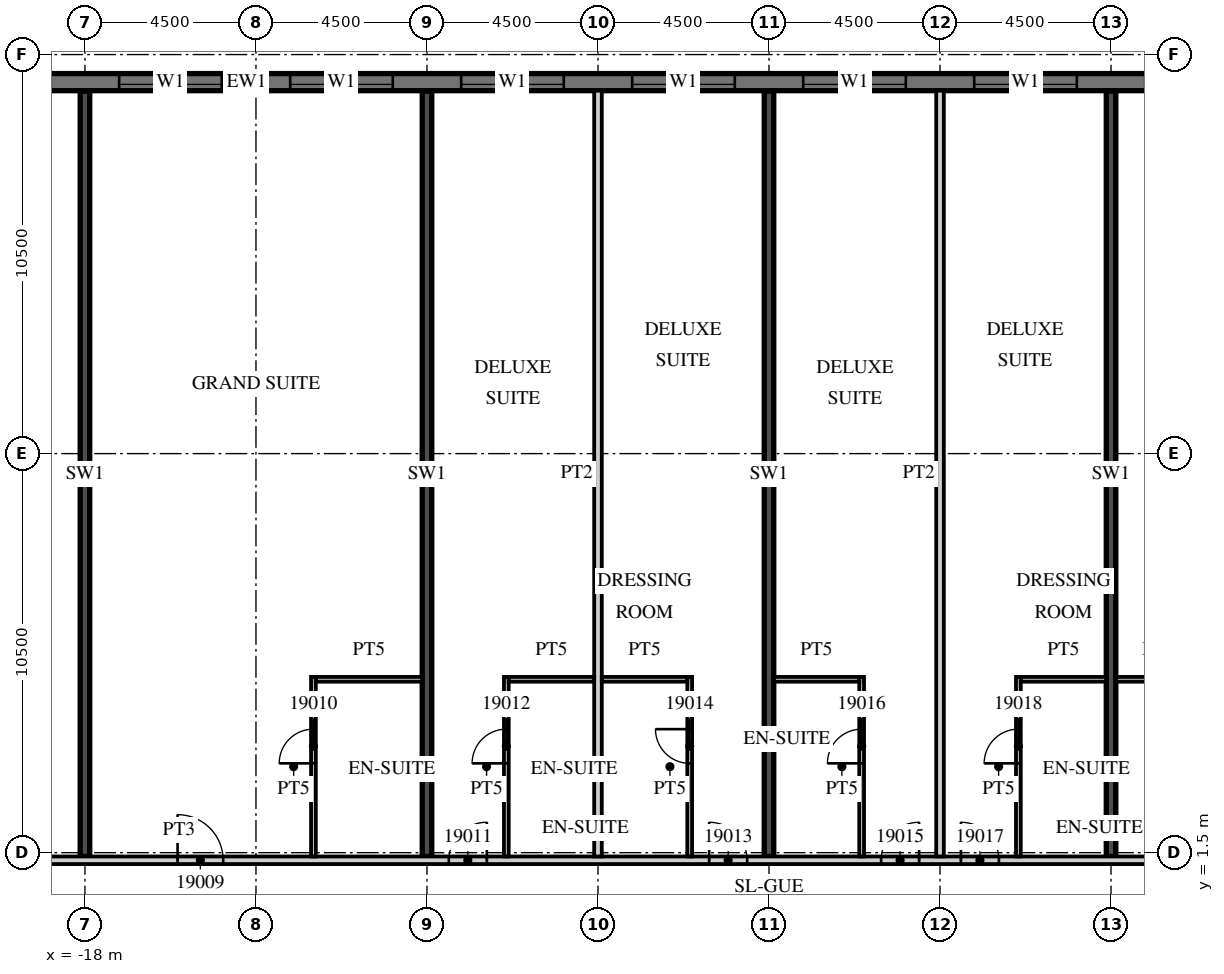
"""IFC4 building model, lengths in metres.
Left out: names, types, materials, properties, quantities, classifications, styles, units other than length and angle.
Written with IfcOpenShell. Run it as: python <this file> out.ifc"""

import sys

from ifc_helpers import new_model, si_unit, direction, frame, frame_2d, origin, place, context, subcontext, project, spatial, rectangle, extrude, element, fill, save


model = new_model("IFC4")
c1 = context("Model", 3, precision=1e-05, world=origin(), true_north=direction((0.0, 1.0)))
c2 = subcontext(c1, "Body", "Model", "MODEL_VIEW")
j1 = project(units=[si_unit("LENGTHUNIT", "METRE"), si_unit("PLANEANGLEUNIT", "RADIAN")], contexts=[c1])
p1 = place(None, origin())
s1 = spatial("IfcSite", under=j1, at=p1, CompositionType="ELEMENT")
p2 = place(p1, origin())
s2 = spatial("IfcBuilding", under=s1, at=p2, CompositionType="ELEMENT")
p3 = place(p2, frame((0.0, 0.0, 93.0)))
s3 = spatial("IfcBuildingStorey", under=s2, at=p3, CompositionType="ELEMENT", Elevation=93.0)
for number, where, z_axis, x_axis in (
    (1, (-18.0, 1.4, 0.0), (0.0, 0.0, 1.0), (0.0, 1.0, 0.0)),
    (2, (-9.0, 1.4, 0.0), (0.0, 0.0, 1.0), (0.0, 1.0, 0.0)),
    (3, (0.0, 1.4, 0.0), (0.0, 0.0, 1.0), (0.0, 1.0, 0.0)),
    (4, (9.0, 1.4, 0.0), (0.0, 0.0, 1.0), (0.0, 1.0, 0.0)),
):
    element("IfcWall", number, at=place(p3, frame(where, z_axis=z_axis, x_axis=x_axis)), inside=s3, PredefinedType="SHEAR", context=c2, shape_type="SweptSolid", body=[
        extrude(rectangle(XDim=20.14, YDim=0.25, at=frame_2d((10.07, 0.0))), origin(), (0.0, 0.0, 1.0), 3.3),
    ])
p4 = place(p3, frame((13.5, 21.775, 0.0), z_axis=(0.0, 0.0, 1.0), x_axis=(-1.0, 0.0, 0.0)))
e5 = element("IfcWall", 5, at=p4, inside=s3, PredefinedType="SOLIDWALL", context=c2, shape_type="SweptSolid", body=[
    extrude(rectangle(XDim=54.5, YDim=0.45, at=frame_2d((27.25, 0.0))), origin(), (0.0, 0.0, 1.0), 3.02),
])
p5 = place(p4, frame((0.9, 0.0, 0.45)))
e6 = element("IfcOpeningElement", 6, at=p5, cuts=e5, PredefinedType="OPENING", context=c2, shape_type="SweptSolid", body=[
    extrude(rectangle(XDim=2.7, YDim=2.25, at=frame_2d((1.35, 1.125))), frame((0.0, 0.235, 0.0), z_axis=(0.0, -1.0, 0.0), x_axis=(1.0, 0.0, 0.0)), (0.0, 0.0, 1.0), 0.47),
])
p6 = place(p4, frame((5.4, 0.0, 0.45)))
e7 = element("IfcOpeningElement", 7, at=p6, cuts=e5, PredefinedType="OPENING", context=c2, shape_type="SweptSolid", body=[
    extrude(rectangle(XDim=2.7, YDim=2.25, at=frame_2d((1.35, 1.125))), frame((0.0, 0.235, 0.0), z_axis=(0.0, -1.0, 0.0), x_axis=(1.0, 0.0, 0.0)), (0.0, 0.0, 1.0), 0.47),
])
p7 = place(p4, frame((9.9, 0.0, 0.45)))
e8 = element("IfcOpeningElement", 8, at=p7, cuts=e5, PredefinedType="OPENING", context=c2, shape_type="SweptSolid", body=[
    extrude(rectangle(XDim=2.7, YDim=2.25, at=frame_2d((1.35, 1.125))), frame((0.0, 0.235, 0.0), z_axis=(0.0, -1.0, 0.0), x_axis=(1.0, 0.0, 0.0)), (0.0, 0.0, 1.0), 0.47),
])
p8 = place(p4, frame((14.4, 0.0, 0.45)))
e9 = element("IfcOpeningElement", 9, at=p8, cuts=e5, PredefinedType="OPENING", context=c2, shape_type="SweptSolid", body=[
    extrude(rectangle(XDim=2.7, YDim=2.25, at=frame_2d((1.35, 1.125))), frame((0.0, 0.235, 0.0), z_axis=(0.0, -1.0, 0.0), x_axis=(1.0, 0.0, 0.0)), (0.0, 0.0, 1.0), 0.47),
])
p9 = place(p4, frame((18.9, 0.0, 0.45)))
e10 = element("IfcOpeningElement", 10, at=p9, cuts=e5, PredefinedType="OPENING", context=c2, shape_type="SweptSolid", body=[
    extrude(rectangle(XDim=2.7, YDim=2.25, at=frame_2d((1.35, 1.125))), frame((0.0, 0.235, 0.0), z_axis=(0.0, -1.0, 0.0), x_axis=(1.0, 0.0, 0.0)), (0.0, 0.0, 1.0), 0.47),
])
p10 = place(p4, frame((23.4, 0.0, 0.45)))
e11 = element("IfcOpeningElement", 11, at=p10, cuts=e5, PredefinedType="OPENING", context=c2, shape_type="SweptSolid", body=[
    extrude(rectangle(XDim=2.7, YDim=2.25, at=frame_2d((1.35, 1.125))), frame((0.0, 0.235, 0.0), z_axis=(0.0, -1.0, 0.0), x_axis=(1.0, 0.0, 0.0)), (0.0, 0.0, 1.0), 0.47),
])
p11 = place(p4, frame((27.9, 0.0, 0.45)))
e12 = element("IfcOpeningElement", 12, at=p11, cuts=e5, PredefinedType="OPENING", context=c2, shape_type="SweptSolid", body=[
    extrude(rectangle(XDim=2.7, YDim=2.25, at=frame_2d((1.35, 1.125))), frame((0.0, 0.235, 0.0), z_axis=(0.0, -1.0, 0.0), x_axis=(1.0, 0.0, 0.0)), (0.0, 0.0, 1.0), 0.47),
])
p12 = place(p4, frame((32.4, 0.0, 0.45)))
e13 = element("IfcOpeningElement", 13, at=p12, cuts=e5, PredefinedType="OPENING", context=c2, shape_type="SweptSolid", body=[
    extrude(rectangle(XDim=2.7, YDim=2.25, at=frame_2d((1.35, 1.125))), frame((0.0, 0.235, 0.0), z_axis=(0.0, -1.0, 0.0), x_axis=(1.0, 0.0, 0.0)), (0.0, 0.0, 1.0), 0.47),
])
p13 = place(p4, frame((36.9, 0.0, 0.45)))
e14 = element("IfcOpeningElement", 14, at=p13, cuts=e5, PredefinedType="OPENING", context=c2, shape_type="SweptSolid", body=[
    extrude(rectangle(XDim=2.7, YDim=2.25, at=frame_2d((1.35, 1.125))), frame((0.0, 0.235, 0.0), z_axis=(0.0, -1.0, 0.0), x_axis=(1.0, 0.0, 0.0)), (0.0, 0.0, 1.0), 0.47),
])
p14 = place(p4, frame((41.4, 0.0, 0.45)))
e15 = element("IfcOpeningElement", 15, at=p14, cuts=e5, PredefinedType="OPENING", context=c2, shape_type="SweptSolid", body=[
    extrude(rectangle(XDim=2.7, YDim=2.25, at=frame_2d((1.35, 1.125))), frame((0.0, 0.235, 0.0), z_axis=(0.0, -1.0, 0.0), x_axis=(1.0, 0.0, 0.0)), (0.0, 0.0, 1.0), 0.47),
])
p15 = place(p4, frame((45.9, 0.0, 0.45)))
e16 = element("IfcOpeningElement", 16, at=p15, cuts=e5, PredefinedType="OPENING", context=c2, shape_type="SweptSolid", body=[
    extrude(rectangle(XDim=2.7, YDim=2.25, at=frame_2d((1.35, 1.125))), frame((0.0, 0.235, 0.0), z_axis=(0.0, -1.0, 0.0), x_axis=(1.0, 0.0, 0.0)), (0.0, 0.0, 1.0), 0.47),
])
p16 = place(p4, frame((50.4, 0.0, 0.45)))
e17 = element("IfcOpeningElement", 17, at=p16, cuts=e5, PredefinedType="OPENING", context=c2, shape_type="SweptSolid", body=[
    extrude(rectangle(XDim=2.7, YDim=2.25, at=frame_2d((1.35, 1.125))), frame((0.0, 0.235, 0.0), z_axis=(0.0, -1.0, 0.0), x_axis=(1.0, 0.0, 0.0)), (0.0, 0.0, 1.0), 0.47),
])
p17 = place(p3, frame((-44.55, 1.3, 0.0), z_axis=(0.0, 0.0, 1.0), x_axis=(1.0, 0.0, 0.0)))
e18 = element("IfcWall", 18, at=p17, inside=s3, PredefinedType="PARTITIONING", context=c2, shape_type="SweptSolid", body=[
    extrude(rectangle(XDim=58.05, YDim=0.2, at=frame_2d((29.025, 0.0))), origin(), (0.0, 0.0, 1.0), 3.02),
])
p18 = place(p17, frame((0.525, 0.0, 0.0)))
e19 = element("IfcOpeningElement", 19, at=p18, cuts=e18, PredefinedType="OPENING", context=c2, shape_type="SweptSolid", body=[
    extrude(rectangle(XDim=1.0, YDim=2.1, at=frame_2d((0.5, 1.05))), frame((0.0, 0.11, 0.0), z_axis=(0.0, -1.0, 0.0), x_axis=(1.0, 0.0, 0.0)), (0.0, 0.0, 1.0), 0.22),
])
p19 = place(p17, frame((4.625, 0.0, 0.0)))
e20 = element("IfcOpeningElement", 20, at=p19, cuts=e18, PredefinedType="OPENING", context=c2, shape_type="SweptSolid", body=[
    extrude(rectangle(XDim=1.0, YDim=2.1, at=frame_2d((0.5, 1.05))), frame((0.0, 0.11, 0.0), z_axis=(0.0, -1.0, 0.0), x_axis=(1.0, 0.0, 0.0)), (0.0, 0.0, 1.0), 0.22),
])
p20 = place(p17, frame((10.987, 0.0, 0.0)))
e21 = element("IfcOpeningElement", 21, at=p20, cuts=e18, PredefinedType="OPENING", context=c2, shape_type="SweptSolid", body=[
    extrude(rectangle(XDim=1.2, YDim=2.1, at=frame_2d((0.6, 1.05))), frame((0.0, 0.11, 0.0), z_axis=(0.0, -1.0, 0.0), x_axis=(1.0, 0.0, 0.0)), (0.0, 0.0, 1.0), 0.22),
])
p21 = place(p17, frame((22.912, 0.0, 0.0)))
e22 = element("IfcOpeningElement", 22, at=p21, cuts=e18, PredefinedType="OPENING", context=c2, shape_type="SweptSolid", body=[
    extrude(rectangle(XDim=1.2, YDim=2.1, at=frame_2d((0.6, 1.05))), frame((0.0, 0.11, 0.0), z_axis=(0.0, -1.0, 0.0), x_axis=(1.0, 0.0, 0.0)), (0.0, 0.0, 1.0), 0.22),
])
p22 = place(p17, frame((28.987, 0.0, 0.0)))
e23 = element("IfcOpeningElement", 23, at=p22, cuts=e18, PredefinedType="OPENING", context=c2, shape_type="SweptSolid", body=[
    extrude(rectangle(XDim=1.2, YDim=2.1, at=frame_2d((0.6, 1.05))), frame((0.0, 0.11, 0.0), z_axis=(0.0, -1.0, 0.0), x_axis=(1.0, 0.0, 0.0)), (0.0, 0.0, 1.0), 0.22),
])
p23 = place(p17, frame((36.125, 0.0, 0.0)))
e24 = element("IfcOpeningElement", 24, at=p23, cuts=e18, PredefinedType="OPENING", context=c2, shape_type="SweptSolid", body=[
    extrude(rectangle(XDim=1.0, YDim=2.1, at=frame_2d((0.5, 1.05))), frame((0.0, 0.11, 0.0), z_axis=(0.0, -1.0, 0.0), x_axis=(1.0, 0.0, 0.0)), (0.0, 0.0, 1.0), 0.22),
])
p24 = place(p17, frame((42.975, 0.0, 0.0)))
e25 = element("IfcOpeningElement", 25, at=p24, cuts=e18, PredefinedType="OPENING", context=c2, shape_type="SweptSolid", body=[
    extrude(rectangle(XDim=1.0, YDim=2.1, at=frame_2d((0.5, 1.05))), frame((0.0, 0.11, 0.0), z_axis=(0.0, -1.0, 0.0), x_axis=(1.0, 0.0, 0.0)), (0.0, 0.0, 1.0), 0.22),
])
p25 = place(p17, frame((47.5, 0.0, 0.0)))
e26 = element("IfcOpeningElement", 26, at=p25, cuts=e18, PredefinedType="OPENING", context=c2, shape_type="SweptSolid", body=[
    extrude(rectangle(XDim=1.0, YDim=2.1, at=frame_2d((0.5, 1.05))), frame((0.0, 0.11, 0.0), z_axis=(0.0, -1.0, 0.0), x_axis=(1.0, 0.0, 0.0)), (0.0, 0.0, 1.0), 0.22),
])
p26 = place(p17, frame((49.6, 0.0, 0.0)))
e27 = element("IfcOpeningElement", 27, at=p26, cuts=e18, PredefinedType="OPENING", context=c2, shape_type="SweptSolid", body=[
    extrude(rectangle(XDim=1.0, YDim=2.1, at=frame_2d((0.5, 1.05))), frame((0.0, 0.11, 0.0), z_axis=(0.0, -1.0, 0.0), x_axis=(1.0, 0.0, 0.0)), (0.0, 0.0, 1.0), 0.22),
])
p27 = place(p17, frame((56.475, 0.0, 0.0)))
e28 = element("IfcOpeningElement", 28, at=p27, cuts=e18, PredefinedType="OPENING", context=c2, shape_type="SweptSolid", body=[
    extrude(rectangle(XDim=1.0, YDim=2.1, at=frame_2d((0.5, 1.05))), frame((0.0, 0.11, 0.0), z_axis=(0.0, -1.0, 0.0), x_axis=(1.0, 0.0, 0.0)), (0.0, 0.0, 1.0), 0.22),
])
p28 = place(p3, frame((-11.988, 1.4, 0.0), z_axis=(0.0, 0.0, 1.0), x_axis=(0.0, 1.0, 0.0)))
e29 = element("IfcWall", 29, at=p28, inside=s3, PredefinedType="PARTITIONING", context=c2, shape_type="SweptSolid", body=[
    extrude(rectangle(XDim=4.725, YDim=0.125, at=frame_2d((2.363, 0.0))), origin(), (0.0, 0.0, 1.0), 3.02),
])
p29 = place(p28, frame((2.45, 0.0, 0.0)))
e30 = element("IfcOpeningElement", 30, at=p29, cuts=e29, PredefinedType="OPENING", context=c2, shape_type="SweptSolid", body=[
    extrude(rectangle(XDim=0.9, YDim=2.1, at=frame_2d((0.45, 1.05))), frame((0.0, 0.073, 0.0), z_axis=(0.0, -1.0, 0.0), x_axis=(1.0, 0.0, 0.0)), (0.0, 0.0, 1.0), 0.145),
])
p30 = place(p3, frame((-11.925, 6.062, 0.0), z_axis=(0.0, 0.0, 1.0), x_axis=(1.0, 0.0, 0.0)))
e31 = element("IfcWall", 31, at=p30, inside=s3, PredefinedType="PARTITIONING", context=c2, shape_type="SweptSolid", body=[
    extrude(rectangle(XDim=2.8, YDim=0.125, at=frame_2d((1.4, 0.0))), origin(), (0.0, 0.0, 1.0), 3.02),
])
p31 = place(p3, frame((-4.5, 1.4, 0.0), z_axis=(0.0, 0.0, 1.0), x_axis=(0.0, 1.0, 0.0)))
e32 = element("IfcWall", 32, at=p31, inside=s3, PredefinedType="PARTITIONING", context=c2, shape_type="SweptSolid", body=[
    extrude(rectangle(XDim=20.15, YDim=0.2, at=frame_2d((10.075, 0.0))), origin(), (0.0, 0.0, 1.0), 3.02),
])
p32 = place(p3, frame((-6.912, 1.4, 0.0), z_axis=(0.0, 0.0, 1.0), x_axis=(0.0, 1.0, 0.0)))
e33 = element("IfcWall", 33, at=p32, inside=s3, PredefinedType="PARTITIONING", context=c2, shape_type="SweptSolid", body=[
    extrude(rectangle(XDim=4.725, YDim=0.125, at=frame_2d((2.363, 0.0))), origin(), (0.0, 0.0, 1.0), 3.02),
])
p33 = place(p32, frame((2.45, 0.0, 0.0)))
e34 = element("IfcOpeningElement", 34, at=p33, cuts=e33, PredefinedType="OPENING", context=c2, shape_type="SweptSolid", body=[
    extrude(rectangle(XDim=0.9, YDim=2.1, at=frame_2d((0.45, 1.05))), frame((0.0, 0.073, 0.0), z_axis=(0.0, -1.0, 0.0), x_axis=(1.0, 0.0, 0.0)), (0.0, 0.0, 1.0), 0.145),
])
p34 = place(p3, frame((-6.85, 6.062, 0.0), z_axis=(0.0, 0.0, 1.0), x_axis=(1.0, 0.0, 0.0)))
e35 = element("IfcWall", 35, at=p34, inside=s3, PredefinedType="PARTITIONING", context=c2, shape_type="SweptSolid", body=[
    extrude(rectangle(XDim=2.25, YDim=0.125, at=frame_2d((1.125, 0.0))), origin(), (0.0, 0.0, 1.0), 3.02),
])
p35 = place(p3, frame((-2.087, 1.4, 0.0), z_axis=(0.0, 0.0, 1.0), x_axis=(0.0, 1.0, 0.0)))
e36 = element("IfcWall", 36, at=p35, inside=s3, PredefinedType="PARTITIONING", context=c2, shape_type="SweptSolid", body=[
    extrude(rectangle(XDim=4.725, YDim=0.125, at=frame_2d((2.363, 0.0))), origin(), (0.0, 0.0, 1.0), 3.02),
])
p36 = place(p35, frame((2.45, 0.0, 0.0)))
e37 = element("IfcOpeningElement", 37, at=p36, cuts=e36, PredefinedType="OPENING", context=c2, shape_type="SweptSolid", body=[
    extrude(rectangle(XDim=0.9, YDim=2.1, at=frame_2d((0.45, 1.05))), frame((0.0, 0.073, 0.0), z_axis=(0.0, -1.0, 0.0), x_axis=(1.0, 0.0, 0.0)), (0.0, 0.0, 1.0), 0.145),
])
p37 = place(p3, frame((-4.4, 6.062, 0.0), z_axis=(0.0, 0.0, 1.0), x_axis=(1.0, 0.0, 0.0)))
e38 = element("IfcWall", 38, at=p37, inside=s3, PredefinedType="PARTITIONING", context=c2, shape_type="SweptSolid", body=[
    extrude(rectangle(XDim=2.25, YDim=0.125, at=frame_2d((1.125, 0.0))), origin(), (0.0, 0.0, 1.0), 3.02),
])
p38 = place(p3, frame((4.5, 1.4, 0.0), z_axis=(0.0, 0.0, 1.0), x_axis=(0.0, 1.0, 0.0)))
e39 = element("IfcWall", 39, at=p38, inside=s3, PredefinedType="PARTITIONING", context=c2, shape_type="SweptSolid", body=[
    extrude(rectangle(XDim=20.15, YDim=0.2, at=frame_2d((10.075, 0.0))), origin(), (0.0, 0.0, 1.0), 3.02),
])
p39 = place(p3, frame((2.438, 1.4, 0.0), z_axis=(0.0, 0.0, 1.0), x_axis=(0.0, 1.0, 0.0)))
e40 = element("IfcWall", 40, at=p39, inside=s3, PredefinedType="PARTITIONING", context=c2, shape_type="SweptSolid", body=[
    extrude(rectangle(XDim=4.725, YDim=0.125, at=frame_2d((2.363, 0.0))), origin(), (0.0, 0.0, 1.0), 3.02),
])
p40 = place(p39, frame((2.45, 0.0, 0.0)))
e41 = element("IfcOpeningElement", 41, at=p40, cuts=e40, PredefinedType="OPENING", context=c2, shape_type="SweptSolid", body=[
    extrude(rectangle(XDim=0.9, YDim=2.1, at=frame_2d((0.45, 1.05))), frame((0.0, 0.073, 0.0), z_axis=(0.0, -1.0, 0.0), x_axis=(1.0, 0.0, 0.0)), (0.0, 0.0, 1.0), 0.145),
])
p41 = place(p3, frame((0.125, 6.062, 0.0), z_axis=(0.0, 0.0, 1.0), x_axis=(1.0, 0.0, 0.0)))
e42 = element("IfcWall", 42, at=p41, inside=s3, PredefinedType="PARTITIONING", context=c2, shape_type="SweptSolid", body=[
    extrude(rectangle(XDim=2.25, YDim=0.125, at=frame_2d((1.125, 0.0))), origin(), (0.0, 0.0, 1.0), 3.02),
])
p42 = place(p3, frame((6.562, 1.4, 0.0), z_axis=(0.0, 0.0, 1.0), x_axis=(0.0, 1.0, 0.0)))
e43 = element("IfcWall", 43, at=p42, inside=s3, PredefinedType="PARTITIONING", context=c2, shape_type="SweptSolid", body=[
    extrude(rectangle(XDim=4.725, YDim=0.125, at=frame_2d((2.363, 0.0))), origin(), (0.0, 0.0, 1.0), 3.02),
])
p43 = place(p42, frame((2.45, 0.0, 0.0)))
e44 = element("IfcOpeningElement", 44, at=p43, cuts=e43, PredefinedType="OPENING", context=c2, shape_type="SweptSolid", body=[
    extrude(rectangle(XDim=0.9, YDim=2.1, at=frame_2d((0.45, 1.05))), frame((0.0, 0.073, 0.0), z_axis=(0.0, -1.0, 0.0), x_axis=(1.0, 0.0, 0.0)), (0.0, 0.0, 1.0), 0.145),
])
for number, where, z_axis, x_axis in (
    (45, (6.625, 6.062, 0.0), (0.0, 0.0, 1.0), (1.0, 0.0, 0.0)),
    (46, (9.125, 6.062, 0.0), (0.0, 0.0, 1.0), (1.0, 0.0, 0.0)),
):
    element("IfcWall", number, at=place(p3, frame(where, z_axis=z_axis, x_axis=x_axis)), inside=s3, PredefinedType="PARTITIONING", context=c2, shape_type="SweptSolid", body=[
        extrude(rectangle(XDim=2.25, YDim=0.125, at=frame_2d((1.125, 0.0))), origin(), (0.0, 0.0, 1.0), 3.02),
    ])
p44 = place(p6, origin())
e47 = element("IfcWindow", 47, at=p44, inside=s3, PartitioningType="SINGLE_PANEL", PredefinedType="WINDOW", context=c2, shape_type="SweptSolid", body=[
    extrude(rectangle(XDim=2.7, YDim=2.25, at=frame_2d((1.35, 1.125))), frame((0.0, 0.09, 0.0), z_axis=(0.0, -1.0, 0.0), x_axis=(1.0, 0.0, 0.0)), (0.0, 0.0, 1.0), 0.06),
])
fill(e7, e47)
p45 = place(p7, origin())
e48 = element("IfcWindow", 48, at=p45, inside=s3, PartitioningType="SINGLE_PANEL", PredefinedType="WINDOW", context=c2, shape_type="SweptSolid", body=[
    extrude(rectangle(XDim=2.7, YDim=2.25, at=frame_2d((1.35, 1.125))), frame((0.0, 0.09, 0.0), z_axis=(0.0, -1.0, 0.0), x_axis=(1.0, 0.0, 0.0)), (0.0, 0.0, 1.0), 0.06),
])
fill(e8, e48)
p46 = place(p8, origin())
e49 = element("IfcWindow", 49, at=p46, inside=s3, PartitioningType="SINGLE_PANEL", PredefinedType="WINDOW", context=c2, shape_type="SweptSolid", body=[
    extrude(rectangle(XDim=2.7, YDim=2.25, at=frame_2d((1.35, 1.125))), frame((0.0, 0.09, 0.0), z_axis=(0.0, -1.0, 0.0), x_axis=(1.0, 0.0, 0.0)), (0.0, 0.0, 1.0), 0.06),
])
fill(e9, e49)
p47 = place(p9, origin())
e50 = element("IfcWindow", 50, at=p47, inside=s3, PartitioningType="SINGLE_PANEL", PredefinedType="WINDOW", context=c2, shape_type="SweptSolid", body=[
    extrude(rectangle(XDim=2.7, YDim=2.25, at=frame_2d((1.35, 1.125))), frame((0.0, 0.09, 0.0), z_axis=(0.0, -1.0, 0.0), x_axis=(1.0, 0.0, 0.0)), (0.0, 0.0, 1.0), 0.06),
])
fill(e10, e50)
p48 = place(p10, origin())
e51 = element("IfcWindow", 51, at=p48, inside=s3, PartitioningType="SINGLE_PANEL", PredefinedType="WINDOW", context=c2, shape_type="SweptSolid", body=[
    extrude(rectangle(XDim=2.7, YDim=2.25, at=frame_2d((1.35, 1.125))), frame((0.0, 0.09, 0.0), z_axis=(0.0, -1.0, 0.0), x_axis=(1.0, 0.0, 0.0)), (0.0, 0.0, 1.0), 0.06),
])
fill(e11, e51)
p49 = place(p11, origin())
e52 = element("IfcWindow", 52, at=p49, inside=s3, PartitioningType="SINGLE_PANEL", PredefinedType="WINDOW", context=c2, shape_type="SweptSolid", body=[
    extrude(rectangle(XDim=2.7, YDim=2.25, at=frame_2d((1.35, 1.125))), frame((0.0, 0.09, 0.0), z_axis=(0.0, -1.0, 0.0), x_axis=(1.0, 0.0, 0.0)), (0.0, 0.0, 1.0), 0.06),
])
fill(e12, e52)
p50 = place(p22, origin())
e53 = element("IfcDoor", 53, at=p50, inside=s3, OperationType="SINGLE_SWING_LEFT", PredefinedType="DOOR", context=c2, shape_type="SweptSolid", body=[
    extrude(rectangle(XDim=1.2, YDim=2.1, at=frame_2d((0.6, 1.05))), frame((0.0, 0.025, 0.0), z_axis=(0.0, -1.0, 0.0), x_axis=(1.0, 0.0, 0.0)), (0.0, 0.0, 1.0), 0.05),
])
fill(e23, e53)
p51 = place(p29, origin())
e54 = element("IfcDoor", 54, at=p51, inside=s3, OperationType="SINGLE_SWING_LEFT", PredefinedType="DOOR", context=c2, shape_type="SweptSolid", body=[
    extrude(rectangle(XDim=0.9, YDim=2.1, at=frame_2d((0.45, 1.05))), frame((0.0, 0.025, 0.0), z_axis=(0.0, -1.0, 0.0), x_axis=(1.0, 0.0, 0.0)), (0.0, 0.0, 1.0), 0.05),
])
fill(e30, e54)
p52 = place(p23, origin())
e55 = element("IfcDoor", 55, at=p52, inside=s3, OperationType="SINGLE_SWING_RIGHT", PredefinedType="DOOR", context=c2, shape_type="SweptSolid", body=[
    extrude(rectangle(XDim=1.0, YDim=2.1, at=frame_2d((0.5, 1.05))), frame((0.0, 0.025, 0.0), z_axis=(0.0, -1.0, 0.0), x_axis=(1.0, 0.0, 0.0)), (0.0, 0.0, 1.0), 0.05),
])
fill(e24, e55)
p53 = place(p33, origin())
e56 = element("IfcDoor", 56, at=p53, inside=s3, OperationType="SINGLE_SWING_LEFT", PredefinedType="DOOR", context=c2, shape_type="SweptSolid", body=[
    extrude(rectangle(XDim=0.9, YDim=2.1, at=frame_2d((0.45, 1.05))), frame((0.0, 0.025, 0.0), z_axis=(0.0, -1.0, 0.0), x_axis=(1.0, 0.0, 0.0)), (0.0, 0.0, 1.0), 0.05),
])
fill(e34, e56)
p54 = place(p24, origin())
e57 = element("IfcDoor", 57, at=p54, inside=s3, OperationType="SINGLE_SWING_LEFT", PredefinedType="DOOR", context=c2, shape_type="SweptSolid", body=[
    extrude(rectangle(XDim=1.0, YDim=2.1, at=frame_2d((0.5, 1.05))), frame((0.0, 0.025, 0.0), z_axis=(0.0, -1.0, 0.0), x_axis=(1.0, 0.0, 0.0)), (0.0, 0.0, 1.0), 0.05),
])
fill(e25, e57)
p55 = place(p36, origin())
e58 = element("IfcDoor", 58, at=p55, inside=s3, OperationType="SINGLE_SWING_RIGHT", PredefinedType="DOOR", context=c2, shape_type="SweptSolid", body=[
    extrude(rectangle(XDim=0.9, YDim=2.1, at=frame_2d((0.45, 1.05))), frame((0.0, 0.025, 0.0), z_axis=(0.0, -1.0, 0.0), x_axis=(1.0, 0.0, 0.0)), (0.0, 0.0, 1.0), 0.05),
])
fill(e37, e58)
p56 = place(p25, origin())
e59 = element("IfcDoor", 59, at=p56, inside=s3, OperationType="SINGLE_SWING_RIGHT", PredefinedType="DOOR", context=c2, shape_type="SweptSolid", body=[
    extrude(rectangle(XDim=1.0, YDim=2.1, at=frame_2d((0.5, 1.05))), frame((0.0, 0.025, 0.0), z_axis=(0.0, -1.0, 0.0), x_axis=(1.0, 0.0, 0.0)), (0.0, 0.0, 1.0), 0.05),
])
fill(e26, e59)
p57 = place(p40, origin())
e60 = element("IfcDoor", 60, at=p57, inside=s3, OperationType="SINGLE_SWING_LEFT", PredefinedType="DOOR", context=c2, shape_type="SweptSolid", body=[
    extrude(rectangle(XDim=0.9, YDim=2.1, at=frame_2d((0.45, 1.05))), frame((0.0, 0.025, 0.0), z_axis=(0.0, -1.0, 0.0), x_axis=(1.0, 0.0, 0.0)), (0.0, 0.0, 1.0), 0.05),
])
fill(e41, e60)
p58 = place(p26, origin())
e61 = element("IfcDoor", 61, at=p58, inside=s3, OperationType="SINGLE_SWING_LEFT", PredefinedType="DOOR", context=c2, shape_type="SweptSolid", body=[
    extrude(rectangle(XDim=1.0, YDim=2.1, at=frame_2d((0.5, 1.05))), frame((0.0, 0.025, 0.0), z_axis=(0.0, -1.0, 0.0), x_axis=(1.0, 0.0, 0.0)), (0.0, 0.0, 1.0), 0.05),
])
fill(e27, e61)
p59 = place(p43, origin())
e62 = element("IfcDoor", 62, at=p59, inside=s3, OperationType="SINGLE_SWING_LEFT", PredefinedType="DOOR", context=c2, shape_type="SweptSolid", body=[
    extrude(rectangle(XDim=0.9, YDim=2.1, at=frame_2d((0.45, 1.05))), frame((0.0, 0.025, 0.0), z_axis=(0.0, -1.0, 0.0), x_axis=(1.0, 0.0, 0.0)), (0.0, 0.0, 1.0), 0.05),
])
fill(e44, e62)
save(model, sys.argv[1])
